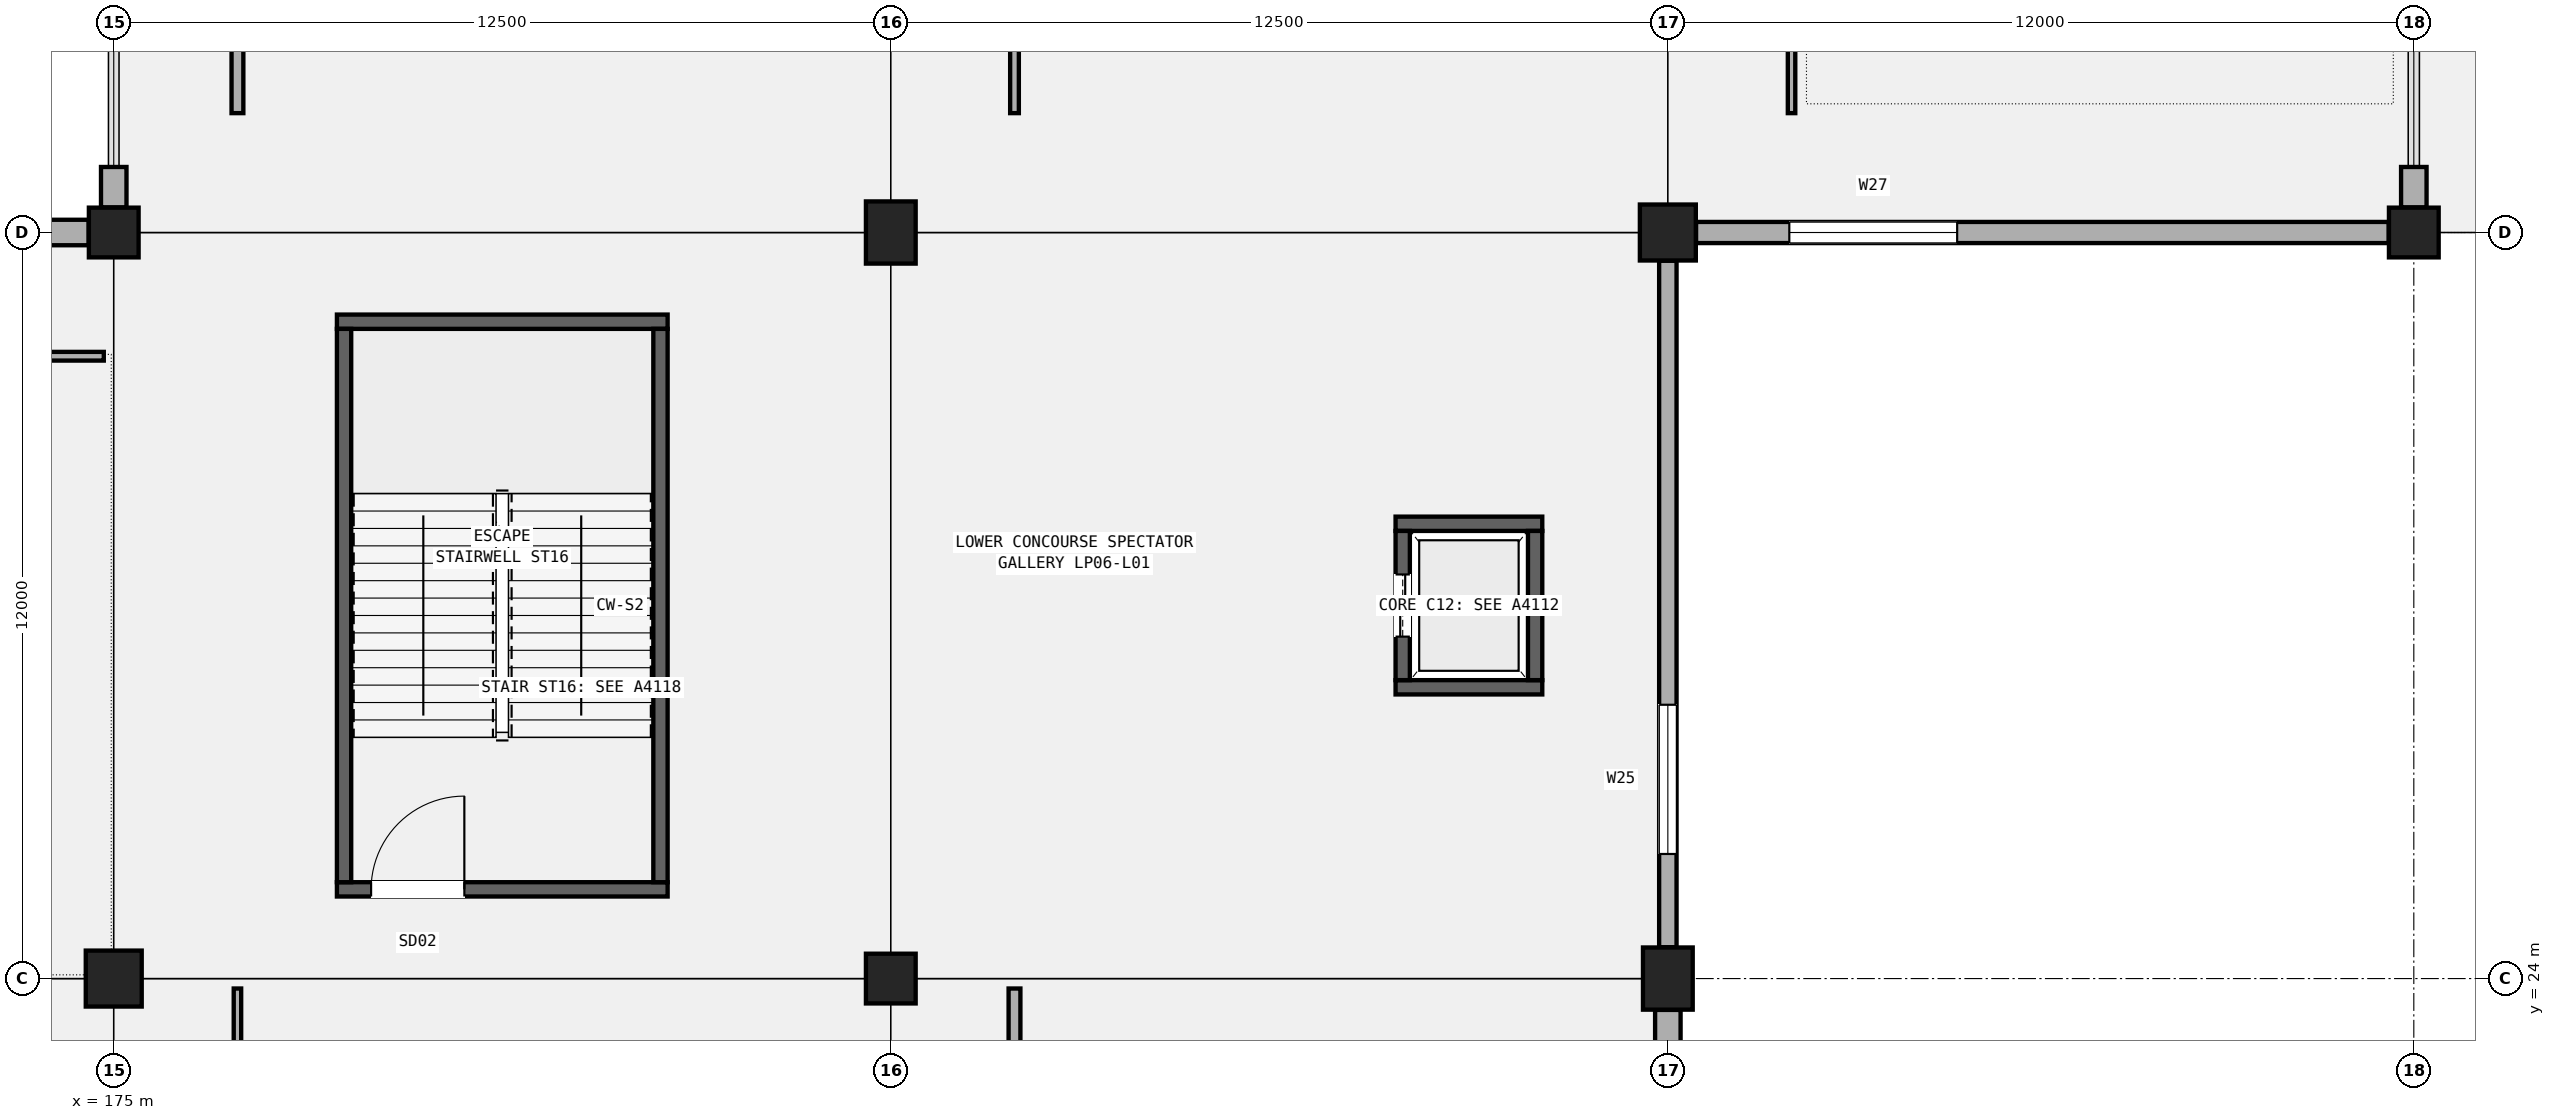
"""IFC4 building model, lengths in metres.
Left out: names, types, materials, properties, quantities, classifications, styles, units other than length and angle.
Written with IfcOpenShell. Run it as: python <this file> out.ifc"""

import sys

from ifc_helpers import new_model, si_unit, direction, frame, frame_2d, origin, origin_2d, place, context, subcontext, project, spatial, rectangle, extrude, element, fill, save


model = new_model("IFC4")
c1 = context("Model", 3, precision=1e-05, world=origin(), true_north=direction((0.0, 1.0)))
c2 = subcontext(c1, "Body", "Model", "MODEL_VIEW")
j1 = project(units=[si_unit("LENGTHUNIT", "METRE"), si_unit("PLANEANGLEUNIT", "RADIAN")], contexts=[c1])
p1 = place(None, origin())
s1 = spatial("IfcSite", under=j1, at=p1, CompositionType="ELEMENT")
p2 = place(p1, origin())
s2 = spatial("IfcBuilding", under=s1, at=p2, CompositionType="ELEMENT")
p3 = place(p2, frame((0.0, 0.0, 5.4)))
s3 = spatial("IfcBuildingStorey", under=s2, at=p3, CompositionType="ELEMENT", Elevation=5.4)
p4 = place(p3, frame((175.0, 24.0, 0.0), z_axis=(0.0, 0.0, 1.0), x_axis=(1.0, 0.0, 0.0)))
e1 = element("IfcColumn", 1, at=p4, inside=s3, PredefinedType="COLUMN", context=c2, shape_type="SweptSolid", body=[
    extrude(rectangle(XDim=0.9, YDim=0.9, at=origin_2d()), origin(), (0.0, 0.0, 1.0), 4.8),
])
for number, where, z_axis, x_axis in (
    (2, (175.0, 36.0, 0.0), (0.0, 0.0, 1.0), (1.0, 0.0, 0.0)),
    (3, (187.5, 24.0, 0.0), (0.0, 0.0, 1.0), (1.0, 0.0, 0.0)),
):
    element("IfcColumn", number, at=place(p3, frame(where, z_axis=z_axis, x_axis=x_axis)), inside=s3, PredefinedType="COLUMN", context=c2, shape_type="SweptSolid", body=[
        extrude(rectangle(XDim=0.8, YDim=0.8, at=origin_2d()), origin(), (0.0, 0.0, 1.0), 4.8),
    ])
for number, where, z_axis, x_axis in (
    (4, (187.5, 36.0, 0.0), (0.0, 0.0, 1.0), (1.0, 0.0, 0.0)),
    (5, (200.0, 24.0, 0.0), (0.0, 0.0, 1.0), (1.0, 0.0, 0.0)),
):
    element("IfcColumn", number, at=place(p3, frame(where, z_axis=z_axis, x_axis=x_axis)), inside=s3, PredefinedType="COLUMN", context=c2, shape_type="SweptSolid", body=[
        extrude(rectangle(XDim=0.8, YDim=1.0, at=origin_2d()), origin(), (0.0, 0.0, 1.0), 4.8),
    ])
p5 = place(p3, frame((200.0, 36.0, 0.0), z_axis=(0.0, 0.0, 1.0), x_axis=(1.0, 0.0, 0.0)))
e6 = element("IfcColumn", 6, at=p5, inside=s3, PredefinedType="COLUMN", context=c2, shape_type="SweptSolid", body=[
    extrude(rectangle(XDim=0.9, YDim=0.9, at=origin_2d()), origin(), (0.0, 0.0, 1.0), 4.8),
])
p6 = place(p3, frame((212.0, 36.0, 0.0), z_axis=(0.0, 0.0, 1.0), x_axis=(1.0, 0.0, 0.0)))
e7 = element("IfcColumn", 7, at=p6, inside=s3, PredefinedType="COLUMN", context=c2, shape_type="SweptSolid", body=[
    extrude(rectangle(XDim=0.8, YDim=0.8, at=origin_2d()), origin(), (0.0, 0.0, 1.0), 4.8),
])
p7 = place(p3, frame((162.954, 36.0, 0.0), z_axis=(0.0, 0.0, 1.0), x_axis=(1.0, 0.0, 0.0)))
e8 = element("IfcWall", 8, at=p7, inside=s3, PredefinedType="SOLIDWALL", context=c2, shape_type="SweptSolid", body=[
    extrude(rectangle(XDim=11.642, YDim=0.41, at=frame_2d((5.821, 0.0))), origin(), (0.0, 0.0, 1.0), 4.15),
])
p8 = place(p7, frame((1.5, 0.0, 0.95)))
e9 = element("IfcOpeningElement", 9, at=p8, cuts=e8, PredefinedType="OPENING", context=c2, shape_type="SweptSolid", body=[
    extrude(rectangle(XDim=1.95, YDim=2.35, at=frame_2d((0.975, 1.175))), frame((0.0, 0.215, 0.0), z_axis=(0.0, -1.0, 0.0), x_axis=(1.0, 0.0, 0.0)), (0.0, 0.0, 1.0), 0.43),
])
p9 = place(p3, frame((175.0, 36.404, 0.0), z_axis=(0.0, 0.0, 1.0), x_axis=(0.0, 1.0, 0.0)))
e10 = element("IfcWall", 10, at=p9, inside=s3, PredefinedType="SOLIDWALL", context=c2, shape_type="SweptSolid", body=[
    extrude(rectangle(XDim=0.65, YDim=0.41, at=frame_2d((0.325, 0.0))), origin(), (0.0, 0.0, 1.0), 4.2),
])
p10 = place(p3, frame((200.0, 22.846, 0.0), z_axis=(0.0, 0.0, 1.0), x_axis=(0.0, 1.0, 0.0)))
e11 = element("IfcWall", 11, at=p10, inside=s3, PredefinedType="SOLIDWALL", context=c2, shape_type="SweptSolid", body=[
    extrude(rectangle(XDim=0.65, YDim=0.41, at=frame_2d((0.325, 0.0))), origin(), (0.0, 0.0, 1.0), 4.2),
])
p11 = place(p3, frame((200.0, 24.504, 0.0), z_axis=(0.0, 0.0, 1.0), x_axis=(0.0, 1.0, 0.0)))
e12 = element("IfcWall", 12, at=p11, inside=s3, PredefinedType="SOLIDWALL", context=c2, shape_type="SweptSolid", body=[
    extrude(rectangle(XDim=11.042, YDim=0.28, at=frame_2d((5.521, 0.0))), origin(), (0.0, 0.0, 1.0), 4.15),
])
p12 = place(p11, frame((1.5, 0.0, 0.95)))
e13 = element("IfcOpeningElement", 13, at=p12, cuts=e12, PredefinedType="OPENING", context=c2, shape_type="SweptSolid", body=[
    extrude(rectangle(XDim=2.4, YDim=2.45, at=frame_2d((1.2, 1.225))), frame((0.0, 0.15, 0.0), z_axis=(0.0, -1.0, 0.0), x_axis=(1.0, 0.0, 0.0)), (0.0, 0.0, 1.0), 0.3),
])
p13 = place(p3, frame((200.454, 36.0, 0.0), z_axis=(0.0, 0.0, 1.0), x_axis=(1.0, 0.0, 0.0)))
e14 = element("IfcWall", 14, at=p13, inside=s3, PredefinedType="SOLIDWALL", context=c2, shape_type="SweptSolid", body=[
    extrude(rectangle(XDim=11.142, YDim=0.34, at=frame_2d((5.571, 0.0))), origin(), (0.0, 0.0, 1.0), 4.2),
])
p14 = place(p13, frame((1.5, 0.0, 0.95)))
e15 = element("IfcOpeningElement", 15, at=p14, cuts=e14, PredefinedType="OPENING", context=c2, shape_type="SweptSolid", body=[
    extrude(rectangle(XDim=2.7, YDim=1.75, at=frame_2d((1.35, 0.875))), frame((0.0, 0.18, 0.0), z_axis=(0.0, -1.0, 0.0), x_axis=(1.0, 0.0, 0.0)), (0.0, 0.0, 1.0), 0.36),
])
p15 = place(p3, frame((212.0, 36.404, 0.0), z_axis=(0.0, 0.0, 1.0), x_axis=(0.0, 1.0, 0.0)))
e16 = element("IfcWall", 16, at=p15, inside=s3, PredefinedType="SOLIDWALL", context=c2, shape_type="SweptSolid", body=[
    extrude(rectangle(XDim=0.65, YDim=0.41, at=frame_2d((0.325, 0.0))), origin(), (0.0, 0.0, 1.0), 4.15),
])
p16 = place(p3, frame((178.59, 25.435, 0.0), z_axis=(0.0, 0.0, 1.0), x_axis=(1.0, 0.0, 0.0)))
e17 = element("IfcWall", 17, at=p16, inside=s3, PredefinedType="SHEAR", context=c2, shape_type="SweptSolid", body=[
    extrude(rectangle(XDim=5.32, YDim=0.23, at=frame_2d((2.66, 0.0))), origin(), (0.0, 0.0, 1.0), 4.55),
])
p17 = place(p16, frame((0.55, 0.0, 0.0)))
e18 = element("IfcOpeningElement", 18, at=p17, cuts=e17, PredefinedType="OPENING", context=c2, shape_type="SweptSolid", body=[
    extrude(rectangle(XDim=1.5, YDim=2.2, at=frame_2d((0.75, 1.1))), frame((0.0, 0.125, 0.0), z_axis=(0.0, -1.0, 0.0), x_axis=(1.0, 0.0, 0.0)), (0.0, 0.0, 1.0), 0.25),
])
p18 = place(p3, frame((178.59, 34.565, 0.0), z_axis=(0.0, 0.0, 1.0), x_axis=(1.0, 0.0, 0.0)))
e19 = element("IfcWall", 19, at=p18, inside=s3, PredefinedType="SHEAR", context=c2, shape_type="SweptSolid", body=[
    extrude(rectangle(XDim=5.32, YDim=0.23, at=frame_2d((2.66, 0.0))), origin(), (0.0, 0.0, 1.0), 4.55),
])
for number, where, z_axis, x_axis in (
    (20, (178.705, 25.55, 0.0), (0.0, 0.0, 1.0), (0.0, 1.0, 0.0)),
    (21, (183.795, 25.55, 0.0), (0.0, 0.0, 1.0), (0.0, 1.0, 0.0)),
):
    element("IfcWall", number, at=place(p3, frame(where, z_axis=z_axis, x_axis=x_axis)), inside=s3, PredefinedType="SHEAR", context=c2, shape_type="SweptSolid", body=[
        extrude(rectangle(XDim=8.9, YDim=0.23, at=frame_2d((4.45, 0.0))), origin(), (0.0, 0.0, 1.0), 4.55),
    ])
for number, where, z_axis, x_axis in (
    (22, (195.62, 28.685, 0.0), (0.0, 0.0, 1.0), (1.0, 0.0, 0.0)),
    (23, (195.62, 31.315, 0.0), (0.0, 0.0, 1.0), (1.0, 0.0, 0.0)),
):
    element("IfcWall", number, at=place(p3, frame(where, z_axis=z_axis, x_axis=x_axis)), inside=s3, PredefinedType="SHEAR", context=c2, shape_type="SweptSolid", body=[
        extrude(rectangle(XDim=2.36, YDim=0.23, at=frame_2d((1.18, 0.0))), origin(), (0.0, 0.0, 1.0), 4.55),
    ])
p19 = place(p3, frame((195.735, 28.8, 0.0), z_axis=(0.0, 0.0, 1.0), x_axis=(0.0, 1.0, 0.0)))
e24 = element("IfcWall", 24, at=p19, inside=s3, PredefinedType="SHEAR", context=c2, shape_type="SweptSolid", body=[
    extrude(rectangle(XDim=2.4, YDim=0.23, at=frame_2d((1.2, 0.0))), origin(), (0.0, 0.0, 1.0), 4.55),
])
p20 = place(p19, frame((0.7, 0.0, 0.0)))
e25 = element("IfcOpeningElement", 25, at=p20, cuts=e24, PredefinedType="OPENING", context=c2, shape_type="SweptSolid", body=[
    extrude(rectangle(XDim=1.0, YDim=2.15, at=frame_2d((0.5, 1.075))), frame((0.0, 0.125, 0.0), z_axis=(0.0, -1.0, 0.0), x_axis=(1.0, 0.0, 0.0)), (0.0, 0.0, 1.0), 0.25),
])
p21 = place(p3, frame((197.865, 28.8, 0.0), z_axis=(0.0, 0.0, 1.0), x_axis=(0.0, 1.0, 0.0)))
e26 = element("IfcWall", 26, at=p21, inside=s3, PredefinedType="SHEAR", context=c2, shape_type="SweptSolid", body=[
    extrude(rectangle(XDim=2.4, YDim=0.23, at=frame_2d((1.2, 0.0))), origin(), (0.0, 0.0, 1.0), 4.55),
])
p22 = place(p3, frame((162.66, 34.01, 0.0), z_axis=(0.0, 0.0, 1.0), x_axis=(1.0, 0.0, 0.0)))
e27 = element("IfcWall", 27, at=p22, inside=s3, PredefinedType="PARTITIONING", context=c2, shape_type="SweptSolid", body=[
    extrude(rectangle(XDim=12.18, YDim=0.14, at=frame_2d((6.09, 0.0))), origin(), (0.0, 0.0, 1.0), 3.92),
])
p23 = place(p22, frame((3.731, 0.0, 0.0), z_axis=(0.0, 0.0, 1.0), x_axis=(-1.0, 0.0, 0.0)))
e28 = element("IfcOpeningElement", 28, at=p23, cuts=e27, PredefinedType="OPENING", context=c2, shape_type="SweptSolid", body=[
    extrude(rectangle(XDim=1.33, YDim=2.22, at=frame_2d((0.665, 1.11))), frame((0.0, 0.08, 0.0), z_axis=(0.0, -1.0, 0.0), x_axis=(1.0, 0.0, 0.0)), (0.0, 0.0, 1.0), 0.16),
])
p24 = place(p22, frame((9.916, 0.0, 0.0), z_axis=(0.0, 0.0, 1.0), x_axis=(-1.0, 0.0, 0.0)))
e29 = element("IfcOpeningElement", 29, at=p24, cuts=e27, PredefinedType="OPENING", context=c2, shape_type="SweptSolid", body=[
    extrude(rectangle(XDim=1.36, YDim=2.25, at=frame_2d((0.68, 1.125))), frame((0.0, 0.08, 0.0), z_axis=(0.0, -1.0, 0.0), x_axis=(1.0, 0.0, 0.0)), (0.0, 0.0, 1.0), 0.16),
])
p25 = place(p3, frame((176.99, 12.142, 0.0), z_axis=(0.0, 0.0, 1.0), x_axis=(0.0, 1.0, 0.0)))
e30 = element("IfcWall", 30, at=p25, inside=s3, PredefinedType="PARTITIONING", context=c2, shape_type="SweptSolid", body=[
    extrude(rectangle(XDim=11.698, YDim=0.12, at=frame_2d((5.849, 0.0))), origin(), (0.0, 0.0, 1.0), 3.92),
])
p26 = place(p25, frame((3.757, 0.0, 0.0), z_axis=(0.0, 0.0, 1.0), x_axis=(-1.0, 0.0, 0.0)))
e31 = element("IfcOpeningElement", 31, at=p26, cuts=e30, PredefinedType="OPENING", context=c2, shape_type="SweptSolid", body=[
    extrude(rectangle(XDim=1.6, YDim=2.3, at=frame_2d((0.8, 1.15))), frame((0.0, 0.07, 0.0), z_axis=(0.0, -1.0, 0.0), x_axis=(1.0, 0.0, 0.0)), (0.0, 0.0, 1.0), 0.14),
])
p27 = place(p25, frame((9.701, 0.0, 0.0), z_axis=(0.0, 0.0, 1.0), x_axis=(-1.0, 0.0, 0.0)))
e32 = element("IfcOpeningElement", 32, at=p27, cuts=e30, PredefinedType="OPENING", context=c2, shape_type="SweptSolid", body=[
    extrude(rectangle(XDim=1.65, YDim=2.28, at=frame_2d((0.825, 1.14))), frame((0.0, 0.07, 0.0), z_axis=(0.0, -1.0, 0.0), x_axis=(1.0, 0.0, 0.0)), (0.0, 0.0, 1.0), 0.14),
])
p28 = place(p3, frame((176.99, 37.92, 0.0), z_axis=(0.0, 0.0, 1.0), x_axis=(0.0, 1.0, 0.0)))
e33 = element("IfcWall", 33, at=p28, inside=s3, PredefinedType="PARTITIONING", context=c2, shape_type="SweptSolid", body=[
    extrude(rectangle(XDim=9.92, YDim=0.19, at=frame_2d((4.96, 0.0))), origin(), (0.0, 0.0, 1.0), 3.92),
])
p29 = place(p28, frame((5.81, 0.0, 0.0), z_axis=(0.0, 0.0, 1.0), x_axis=(-1.0, 0.0, 0.0)))
e34 = element("IfcOpeningElement", 34, at=p29, cuts=e33, PredefinedType="OPENING", context=c2, shape_type="SweptSolid", body=[
    extrude(rectangle(XDim=1.7, YDim=2.32, at=frame_2d((0.85, 1.16))), frame((0.0, 0.105, 0.0), z_axis=(0.0, -1.0, 0.0), x_axis=(1.0, 0.0, 0.0)), (0.0, 0.0, 1.0), 0.21),
])
p30 = place(p3, frame((189.49, 12.172, 0.0), z_axis=(0.0, 0.0, 1.0), x_axis=(0.0, 1.0, 0.0)))
e35 = element("IfcWall", 35, at=p30, inside=s3, PredefinedType="PARTITIONING", context=c2, shape_type="SweptSolid", body=[
    extrude(rectangle(XDim=11.668, YDim=0.19, at=frame_2d((5.834, 0.0))), origin(), (0.0, 0.0, 1.0), 3.92),
])
p31 = place(p30, frame((6.328, 0.0, 0.0), z_axis=(0.0, 0.0, 1.0), x_axis=(-1.0, 0.0, 0.0)))
e36 = element("IfcOpeningElement", 36, at=p31, cuts=e35, PredefinedType="OPENING", context=c2, shape_type="SweptSolid", body=[
    extrude(rectangle(XDim=1.0, YDim=2.14, at=frame_2d((0.5, 1.07))), frame((0.0, 0.105, 0.0), z_axis=(0.0, -1.0, 0.0), x_axis=(1.0, 0.0, 0.0)), (0.0, 0.0, 1.0), 0.21),
])
p32 = place(p3, frame((189.49, 37.92, 0.0), z_axis=(0.0, 0.0, 1.0), x_axis=(0.0, 1.0, 0.0)))
e37 = element("IfcWall", 37, at=p32, inside=s3, PredefinedType="PARTITIONING", context=c2, shape_type="SweptSolid", body=[
    extrude(rectangle(XDim=9.92, YDim=0.14, at=frame_2d((4.96, 0.0))), origin(), (0.0, 0.0, 1.0), 3.92),
])
p33 = place(p32, frame((5.475, 0.0, 0.0), z_axis=(0.0, 0.0, 1.0), x_axis=(-1.0, 0.0, 0.0)))
e38 = element("IfcOpeningElement", 38, at=p33, cuts=e37, PredefinedType="OPENING", context=c2, shape_type="SweptSolid", body=[
    extrude(rectangle(XDim=1.03, YDim=2.12, at=frame_2d((0.515, 1.06))), frame((0.0, 0.08, 0.0), z_axis=(0.0, -1.0, 0.0), x_axis=(1.0, 0.0, 0.0)), (0.0, 0.0, 1.0), 0.16),
])
p34 = place(p3, frame((201.99, 37.92, 0.0), z_axis=(0.0, 0.0, 1.0), x_axis=(0.0, 1.0, 0.0)))
e39 = element("IfcWall", 39, at=p34, inside=s3, PredefinedType="PARTITIONING", context=c2, shape_type="SweptSolid", body=[
    extrude(rectangle(XDim=9.92, YDim=0.12, at=frame_2d((4.96, 0.0))), origin(), (0.0, 0.0, 1.0), 3.92),
])
p35 = place(p34, frame((5.595, 0.0, 0.0), z_axis=(0.0, 0.0, 1.0), x_axis=(-1.0, 0.0, 0.0)))
e40 = element("IfcOpeningElement", 40, at=p35, cuts=e39, PredefinedType="OPENING", context=c2, shape_type="SweptSolid", body=[
    extrude(rectangle(XDim=1.27, YDim=2.2, at=frame_2d((0.635, 1.1))), frame((0.0, 0.07, 0.0), z_axis=(0.0, -1.0, 0.0), x_axis=(1.0, 0.0, 0.0)), (0.0, 0.0, 1.0), 0.14),
])
p36 = place(p12, origin())
e41 = element("IfcWindow", 41, at=p36, inside=s3, PartitioningType="SINGLE_PANEL", PredefinedType="WINDOW", context=c2, shape_type="SweptSolid", body=[
    extrude(rectangle(XDim=2.4, YDim=2.45, at=frame_2d((1.2, 1.225))), frame((0.0, 0.03, 0.0), z_axis=(0.0, -1.0, 0.0), x_axis=(1.0, 0.0, 0.0)), (0.0, 0.0, 1.0), 0.06),
])
fill(e13, e41)
p37 = place(p14, origin())
e42 = element("IfcWindow", 42, at=p37, inside=s3, PartitioningType="SINGLE_PANEL", PredefinedType="WINDOW", context=c2, shape_type="SweptSolid", body=[
    extrude(rectangle(XDim=2.7, YDim=1.75, at=frame_2d((1.35, 0.875))), frame((0.0, 0.03, 0.0), z_axis=(0.0, -1.0, 0.0), x_axis=(1.0, 0.0, 0.0)), (0.0, 0.0, 1.0), 0.06),
])
fill(e15, e42)
p38 = place(p17, origin())
e43 = element("IfcDoor", 43, at=p38, inside=s3, OperationType="SINGLE_SWING_RIGHT", PredefinedType="DOOR", context=c2, shape_type="SweptSolid", body=[
    extrude(rectangle(XDim=1.5, YDim=2.2, at=frame_2d((0.75, 1.1))), frame((0.0, 0.025, 0.0), z_axis=(0.0, -1.0, 0.0), x_axis=(1.0, 0.0, 0.0)), (0.0, 0.0, 1.0), 0.05),
])
fill(e18, e43)
p39 = place(p20, origin())
e44 = element("IfcDoor", 44, at=p39, inside=s3, OperationType="DOUBLE_DOOR_SLIDING", PredefinedType="DOOR", context=c2, shape_type="SweptSolid", body=[
    extrude(rectangle(XDim=1.0, YDim=2.15, at=frame_2d((0.5, 1.075))), frame((0.0, 0.025, 0.0), z_axis=(0.0, -1.0, 0.0), x_axis=(1.0, 0.0, 0.0)), (0.0, 0.0, 1.0), 0.05),
])
fill(e25, e44)
save(model, sys.argv[1])
